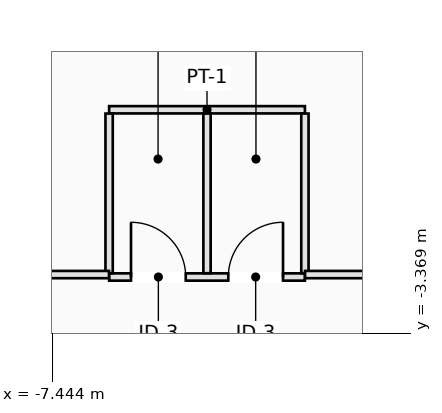
"""IFC4 building model, lengths in metres.
Left out: names, types, materials, properties, quantities, classifications, styles, units other than length and angle.
Written with IfcOpenShell. Run it as: python <this file> out.ifc"""

import sys

from ifc_helpers import new_model, si_unit, direction, frame, frame_2d, origin, place, context, subcontext, project, spatial, rectangle, extrude, element, fill, save


model = new_model("IFC4")
c1 = context("Model", 3, precision=1e-05, world=origin(), true_north=direction((0.0, 1.0)))
c2 = subcontext(c1, "Body", "Model", "MODEL_VIEW")
j1 = project(units=[si_unit("LENGTHUNIT", "METRE"), si_unit("PLANEANGLEUNIT", "RADIAN")], contexts=[c1])
p1 = place(None, origin())
s1 = spatial("IfcSite", under=j1, at=p1, CompositionType="ELEMENT")
p2 = place(p1, origin())
s2 = spatial("IfcBuilding", under=s1, at=p2, CompositionType="ELEMENT")
p3 = place(p2, frame((0.0, 0.0, 80.1)))
s3 = spatial("IfcBuildingStorey", under=s2, at=p3, CompositionType="ELEMENT", Elevation=80.1)
p4 = place(p3, frame((-6.51, -2.44, 0.0), z_axis=(0.0, 0.0, 1.0), x_axis=(1.0, 0.0, 0.0)))
e1 = element("IfcWall", 1, at=p4, inside=s3, PredefinedType="PARTITIONING", context=c2, shape_type="SweptSolid", body=[
    extrude(rectangle(XDim=3.22, YDim=0.12, at=frame_2d((1.61, 0.0))), origin(), (0.0, 0.0, 1.0), 3.25),
])
p5 = place(p4, frame((0.36, 0.0, 0.0)))
e2 = element("IfcOpeningElement", 2, at=p5, cuts=e1, PredefinedType="OPENING", context=c2, shape_type="SweptSolid", body=[
    extrude(rectangle(XDim=0.9, YDim=2.12, at=frame_2d((0.45, 1.06))), frame((0.0, 0.07, 0.0), z_axis=(0.0, -1.0, 0.0), x_axis=(1.0, 0.0, 0.0)), (0.0, 0.0, 1.0), 0.14),
])
p6 = place(p4, frame((1.96, 0.0, 0.0)))
e3 = element("IfcOpeningElement", 3, at=p6, cuts=e1, PredefinedType="OPENING", context=c2, shape_type="SweptSolid", body=[
    extrude(rectangle(XDim=0.9, YDim=2.12, at=frame_2d((0.45, 1.06))), frame((0.0, 0.07, 0.0), z_axis=(0.0, -1.0, 0.0), x_axis=(1.0, 0.0, 0.0)), (0.0, 0.0, 1.0), 0.14),
])
p7 = place(p3, frame((-6.51, 0.31, 0.0), z_axis=(0.0, 0.0, 1.0), x_axis=(1.0, 0.0, 0.0)))
e4 = element("IfcWall", 4, at=p7, inside=s3, PredefinedType="PARTITIONING", context=c2, shape_type="SweptSolid", body=[
    extrude(rectangle(XDim=3.22, YDim=0.12, at=frame_2d((1.61, 0.0))), origin(), (0.0, 0.0, 1.0), 2.891),
])
for number, where, z_axis, x_axis in (
    (5, (-6.51, -2.378, 0.0), (0.0, 0.0, 1.0), (0.0, 1.0, 0.0)),
    (6, (-4.9, -2.378, 0.0), (0.0, 0.0, 1.0), (0.0, 1.0, 0.0)),
    (7, (-3.29, -2.378, 0.0), (0.0, 0.0, 1.0), (0.0, 1.0, 0.0)),
):
    element("IfcWall", number, at=place(p3, frame(where, z_axis=z_axis, x_axis=x_axis)), inside=s3, PredefinedType="PARTITIONING", context=c2, shape_type="SweptSolid", body=[
        extrude(rectangle(XDim=2.626, YDim=0.12, at=frame_2d((1.313, 0.0))), origin(), (0.0, 0.0, 1.0), 3.25),
    ])
p8 = place(p3, frame((-8.65, -2.4, 0.0), z_axis=(0.0, 0.0, 1.0), x_axis=(1.0, 0.0, 0.0)))
e8 = element("IfcWall", 8, at=p8, inside=s3, PredefinedType="PARTITIONING", context=c2, shape_type="SweptSolid", body=[
    extrude(rectangle(XDim=2.138, YDim=0.12, at=frame_2d((1.069, 0.0))), origin(), (0.0, 0.0, 1.0), 3.25),
])
p9 = place(p3, frame((-3.288, -2.4, 0.0), z_axis=(0.0, 0.0, 1.0), x_axis=(1.0, 0.0, 0.0)))
e9 = element("IfcWall", 9, at=p9, inside=s3, PredefinedType="PARTITIONING", context=c2, shape_type="SweptSolid", body=[
    extrude(rectangle(XDim=6.576, YDim=0.12, at=frame_2d((3.288, 0.0))), origin(), (0.0, 0.0, 1.0), 3.25),
])
p10 = place(p5, origin())
e10 = element("IfcDoor", 10, at=p10, inside=s3, OperationType="SINGLE_SWING_LEFT", PredefinedType="DOOR", context=c2, shape_type="SweptSolid", body=[
    extrude(rectangle(XDim=0.9, YDim=2.12, at=frame_2d((0.45, 1.06))), frame((0.0, 0.025, 0.0), z_axis=(0.0, -1.0, 0.0), x_axis=(1.0, 0.0, 0.0)), (0.0, 0.0, 1.0), 0.05),
])
fill(e2, e10)
p11 = place(p6, origin())
e11 = element("IfcDoor", 11, at=p11, inside=s3, OperationType="SINGLE_SWING_RIGHT", PredefinedType="DOOR", context=c2, shape_type="SweptSolid", body=[
    extrude(rectangle(XDim=0.9, YDim=2.12, at=frame_2d((0.45, 1.06))), frame((0.0, 0.025, 0.0), z_axis=(0.0, -1.0, 0.0), x_axis=(1.0, 0.0, 0.0)), (0.0, 0.0, 1.0), 0.05),
])
fill(e3, e11)
save(model, sys.argv[1])
